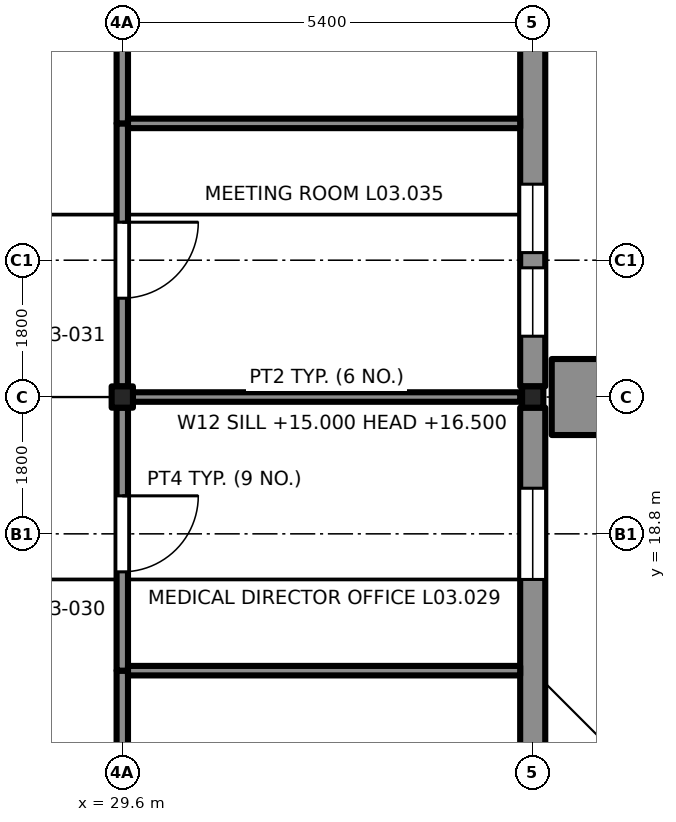
"""IFC4 building model, lengths in metres.
Left out: names, types, materials, properties, quantities, classifications, styles, units other than length and angle.
Written with IfcOpenShell. Run it as: python <this file> out.ifc"""

import sys

from ifc_helpers import new_model, si_unit, direction, frame, frame_2d, origin, origin_2d, place, context, subcontext, project, spatial, rectangle, extrude, element, fill, save


model = new_model("IFC4")
c1 = context("Model", 3, precision=1e-05, world=origin(), true_north=direction((0.0, 1.0)))
c2 = subcontext(c1, "Body", "Model", "MODEL_VIEW")
j1 = project(units=[si_unit("LENGTHUNIT", "METRE"), si_unit("PLANEANGLEUNIT", "RADIAN")], contexts=[c1])
p1 = place(None, origin())
s1 = spatial("IfcSite", under=j1, at=p1, CompositionType="ELEMENT")
p2 = place(p1, origin())
s2 = spatial("IfcBuilding", under=s1, at=p2, CompositionType="ELEMENT")
p3 = place(p2, frame((0.0, 0.0, 14.1)))
s3 = spatial("IfcBuildingStorey", under=s2, at=p3, CompositionType="ELEMENT", Elevation=14.1)
for number, where, z_axis, x_axis in (
    (1, (29.6, 20.6, 0.0), (0.0, 0.0, 1.0), (1.0, 0.0, 0.0)),
    (2, (35.0, 20.6, 0.0), (0.0, 0.0, 1.0), (1.0, 0.0, 0.0)),
):
    element("IfcColumn", number, at=place(p3, frame(where, z_axis=z_axis, x_axis=x_axis)), inside=s3, PredefinedType="COLUMN", context=c2, shape_type="SweptSolid", body=[
        extrude(rectangle(XDim=0.28, YDim=0.28, at=origin_2d()), origin(), (0.0, 0.0, 1.0), 3.9),
    ])
p4 = place(p3, frame((35.0, 20.46, 0.0), z_axis=(0.0, 0.0, 1.0), x_axis=(0.0, -1.0, 0.0)))
e3 = element("IfcWall", 3, at=p4, inside=s3, PredefinedType="SOLIDWALL", context=c2, shape_type="SweptSolid", body=[
    extrude(rectangle(XDim=6.92, YDim=0.33, at=frame_2d((3.46, 0.0))), origin(), (0.0, 0.0, 1.0), 3.2),
])
p5 = place(p4, frame((4.66, 0.0, 0.9)))
e4 = element("IfcOpeningElement", 4, at=p5, cuts=e3, PredefinedType="OPENING", context=c2, shape_type="SweptSolid", body=[
    extrude(rectangle(XDim=1.2, YDim=1.5, at=frame_2d((0.6, 0.75))), frame((0.0, 0.175, 0.0), z_axis=(0.0, -1.0, 0.0), x_axis=(1.0, 0.0, 0.0)), (0.0, 0.0, 1.0), 0.35),
])
p6 = place(p4, frame((1.06, 0.0, 0.9)))
e5 = element("IfcOpeningElement", 5, at=p6, cuts=e3, PredefinedType="OPENING", context=c2, shape_type="SweptSolid", body=[
    extrude(rectangle(XDim=1.2, YDim=1.5, at=frame_2d((0.6, 0.75))), frame((0.0, 0.175, 0.0), z_axis=(0.0, -1.0, 0.0), x_axis=(1.0, 0.0, 0.0)), (0.0, 0.0, 1.0), 0.35),
])
p7 = place(p3, frame((35.0, 27.66, 0.0), z_axis=(0.0, 0.0, 1.0), x_axis=(0.0, -1.0, 0.0)))
e6 = element("IfcWall", 6, at=p7, inside=s3, PredefinedType="SOLIDWALL", context=c2, shape_type="SweptSolid", body=[
    extrude(rectangle(XDim=6.92, YDim=0.33, at=frame_2d((3.46, 0.0))), origin(), (0.0, 0.0, 1.0), 3.2),
])
p8 = place(p7, frame((5.36, 0.0, 0.6)))
e7 = element("IfcOpeningElement", 7, at=p8, cuts=e6, PredefinedType="OPENING", context=c2, shape_type="SweptSolid", body=[
    extrude(rectangle(XDim=0.9, YDim=2.4, at=frame_2d((0.45, 1.2))), frame((0.0, 0.175, 0.0), z_axis=(0.0, -1.0, 0.0), x_axis=(1.0, 0.0, 0.0)), (0.0, 0.0, 1.0), 0.35),
])
p9 = place(p7, frame((4.26, 0.0, 0.6)))
e8 = element("IfcOpeningElement", 8, at=p9, cuts=e6, PredefinedType="OPENING", context=c2, shape_type="SweptSolid", body=[
    extrude(rectangle(XDim=0.9, YDim=2.4, at=frame_2d((0.45, 1.2))), frame((0.0, 0.175, 0.0), z_axis=(0.0, -1.0, 0.0), x_axis=(1.0, 0.0, 0.0)), (0.0, 0.0, 1.0), 0.35),
])
p10 = place(p7, frame((1.06, 0.0, 0.9)))
e9 = element("IfcOpeningElement", 9, at=p10, cuts=e6, PredefinedType="OPENING", context=c2, shape_type="SweptSolid", body=[
    extrude(rectangle(XDim=1.2, YDim=1.5, at=frame_2d((0.6, 0.75))), frame((0.0, 0.175, 0.0), z_axis=(0.0, -1.0, 0.0), x_axis=(1.0, 0.0, 0.0)), (0.0, 0.0, 1.0), 0.35),
])
p11 = place(p3, frame((35.625, 21.1, 0.0), z_axis=(0.0, 0.0, 1.0), x_axis=(0.0, -1.0, 0.0)))
e10 = element("IfcWall", 10, at=p11, inside=s3, PredefinedType="SOLIDWALL", context=c2, shape_type="SweptSolid", body=[
    extrude(rectangle(XDim=1.0, YDim=0.75, at=frame_2d((0.5, 0.0))), origin(), (0.0, 0.0, 1.0), 3.9),
])
p12 = place(p3, frame((35.0, 16.4, 3.2), z_axis=(0.0, 0.0, 1.0), x_axis=(0.0, -1.0, 0.0)))
e11 = element("IfcWall", 11, at=p12, inside=s3, PredefinedType="SOLIDWALL", context=c2, shape_type="SweptSolid", body=[
    extrude(rectangle(XDim=1.5, YDim=0.23, at=frame_2d((0.75, 0.0))), origin(), (0.0, 0.0, 1.0), 3.1),
])
p13 = place(p3, frame((35.0, 17.6, 3.2), z_axis=(0.0, 0.0, 1.0), x_axis=(0.0, -1.0, 0.0)))
e12 = element("IfcWall", 12, at=p13, inside=s3, PredefinedType="SOLIDWALL", context=c2, shape_type="SweptSolid", body=[
    extrude(rectangle(XDim=1.2, YDim=0.23, at=frame_2d((0.6, 0.0))), origin(), (0.0, 0.0, 1.0), 4.1),
])
p14 = place(p3, frame((35.0, 19.1, 3.2), z_axis=(0.0, 0.0, 1.0), x_axis=(0.0, -1.0, 0.0)))
e13 = element("IfcWall", 13, at=p14, inside=s3, PredefinedType="SOLIDWALL", context=c2, shape_type="SweptSolid", body=[
    extrude(rectangle(XDim=1.5, YDim=0.23, at=frame_2d((0.75, 0.0))), origin(), (0.0, 0.0, 1.0), 3.1),
])
p15 = place(p3, frame((35.0, 20.46, 3.2), z_axis=(0.0, 0.0, 1.0), x_axis=(0.0, -1.0, 0.0)))
e14 = element("IfcWall", 14, at=p15, inside=s3, PredefinedType="SOLIDWALL", context=c2, shape_type="SweptSolid", body=[
    extrude(rectangle(XDim=1.36, YDim=0.23, at=frame_2d((0.68, 0.0))), origin(), (0.0, 0.0, 1.0), 2.1),
])
p16 = place(p3, frame((35.0, 22.1, 3.2), z_axis=(0.0, 0.0, 1.0), x_axis=(0.0, -1.0, 0.0)))
e15 = element("IfcWall", 15, at=p16, inside=s3, PredefinedType="SOLIDWALL", context=c2, shape_type="SweptSolid", body=[
    extrude(rectangle(XDim=1.36, YDim=0.23, at=frame_2d((0.68, 0.0))), origin(), (0.0, 0.0, 1.0), 2.1),
])
p17 = place(p3, frame((35.0, 23.6, 3.2), z_axis=(0.0, 0.0, 1.0), x_axis=(0.0, -1.0, 0.0)))
e16 = element("IfcWall", 16, at=p17, inside=s3, PredefinedType="SOLIDWALL", context=c2, shape_type="SweptSolid", body=[
    extrude(rectangle(XDim=1.5, YDim=0.23, at=frame_2d((0.75, 0.0))), origin(), (0.0, 0.0, 1.0), 3.1),
])
p18 = place(p3, frame((35.0, 24.8, 3.2), z_axis=(0.0, 0.0, 1.0), x_axis=(0.0, -1.0, 0.0)))
e17 = element("IfcWall", 17, at=p18, inside=s3, PredefinedType="SOLIDWALL", context=c2, shape_type="SweptSolid", body=[
    extrude(rectangle(XDim=1.2, YDim=0.23, at=frame_2d((0.6, 0.0))), origin(), (0.0, 0.0, 1.0), 4.1),
])
p19 = place(p3, frame((35.0, 26.3, 3.2), z_axis=(0.0, 0.0, 1.0), x_axis=(0.0, -1.0, 0.0)))
e18 = element("IfcWall", 18, at=p19, inside=s3, PredefinedType="SOLIDWALL", context=c2, shape_type="SweptSolid", body=[
    extrude(rectangle(XDim=1.5, YDim=0.23, at=frame_2d((0.75, 0.0))), origin(), (0.0, 0.0, 1.0), 3.1),
])
p20 = place(p3, frame((29.6, 17.0, 0.0), z_axis=(0.0, 0.0, 1.0), x_axis=(0.0, -1.0, 0.0)))
e19 = element("IfcWall", 19, at=p20, inside=s3, PredefinedType="PARTITIONING", context=c2, shape_type="SweptSolid", body=[
    extrude(rectangle(XDim=3.46, YDim=0.15, at=frame_2d((1.73, 0.0))), origin(), (0.0, 0.0, 1.0), 5.233),
])
p21 = place(p20, frame((1.3, 0.0, 0.0)))
e20 = element("IfcOpeningElement", 20, at=p21, cuts=e19, PredefinedType="OPENING", context=c2, shape_type="SweptSolid", body=[
    extrude(rectangle(XDim=1.0, YDim=2.1, at=frame_2d((0.5, 1.05))), frame((0.0, 0.085, 0.0), z_axis=(0.0, -1.0, 0.0), x_axis=(1.0, 0.0, 0.0)), (0.0, 0.0, 1.0), 0.17),
])
p22 = place(p3, frame((29.6, 20.46, 0.0), z_axis=(0.0, 0.0, 1.0), x_axis=(0.0, -1.0, 0.0)))
e21 = element("IfcWall", 21, at=p22, inside=s3, PredefinedType="PARTITIONING", context=c2, shape_type="SweptSolid", body=[
    extrude(rectangle(XDim=3.46, YDim=0.15, at=frame_2d((1.73, 0.0))), origin(), (0.0, 0.0, 1.0), 5.233),
])
p23 = place(p22, frame((1.16, 0.0, 0.0)))
e22 = element("IfcOpeningElement", 22, at=p23, cuts=e21, PredefinedType="OPENING", context=c2, shape_type="SweptSolid", body=[
    extrude(rectangle(XDim=1.0, YDim=2.1, at=frame_2d((0.5, 1.05))), frame((0.0, 0.085, 0.0), z_axis=(0.0, -1.0, 0.0), x_axis=(1.0, 0.0, 0.0)), (0.0, 0.0, 1.0), 0.17),
])
p24 = place(p3, frame((34.835, 17.0, 0.0), z_axis=(0.0, 0.0, 1.0), x_axis=(-1.0, 0.0, 0.0)))
e23 = element("IfcWall", 23, at=p24, inside=s3, PredefinedType="PARTITIONING", context=c2, shape_type="SweptSolid", body=[
    extrude(rectangle(XDim=5.16, YDim=0.125, at=frame_2d((2.58, 0.0))), origin(), (0.0, 0.0, 1.0), 5.233),
])
p25 = place(p3, frame((29.6, 24.2, 0.0), z_axis=(0.0, 0.0, 1.0), x_axis=(0.0, -1.0, 0.0)))
e24 = element("IfcWall", 24, at=p25, inside=s3, PredefinedType="PARTITIONING", context=c2, shape_type="SweptSolid", body=[
    extrude(rectangle(XDim=3.46, YDim=0.15, at=frame_2d((1.73, 0.0))), origin(), (0.0, 0.0, 1.0), 5.233),
])
p26 = place(p25, frame((1.3, 0.0, 0.0)))
e25 = element("IfcOpeningElement", 25, at=p26, cuts=e24, PredefinedType="OPENING", context=c2, shape_type="SweptSolid", body=[
    extrude(rectangle(XDim=1.0, YDim=2.1, at=frame_2d((0.5, 1.05))), frame((0.0, 0.085, 0.0), z_axis=(0.0, -1.0, 0.0), x_axis=(1.0, 0.0, 0.0)), (0.0, 0.0, 1.0), 0.17),
])
p27 = place(p3, frame((34.835, 20.6, 0.0), z_axis=(0.0, 0.0, 1.0), x_axis=(-1.0, 0.0, 0.0)))
e26 = element("IfcWall", 26, at=p27, inside=s3, PredefinedType="PARTITIONING", context=c2, shape_type="SweptSolid", body=[
    extrude(rectangle(XDim=5.095, YDim=0.125, at=frame_2d((2.547, 0.0))), origin(), (0.0, 0.0, 1.0), 3.9),
])
p28 = place(p3, frame((29.6, 27.66, 0.0), z_axis=(0.0, 0.0, 1.0), x_axis=(0.0, -1.0, 0.0)))
e27 = element("IfcWall", 27, at=p28, inside=s3, PredefinedType="PARTITIONING", context=c2, shape_type="SweptSolid", body=[
    extrude(rectangle(XDim=3.46, YDim=0.15, at=frame_2d((1.73, 0.0))), origin(), (0.0, 0.0, 1.0), 5.233),
])
p29 = place(p28, frame((1.16, 0.0, 0.0)))
e28 = element("IfcOpeningElement", 28, at=p29, cuts=e27, PredefinedType="OPENING", context=c2, shape_type="SweptSolid", body=[
    extrude(rectangle(XDim=1.0, YDim=2.1, at=frame_2d((0.5, 1.05))), frame((0.0, 0.085, 0.0), z_axis=(0.0, -1.0, 0.0), x_axis=(1.0, 0.0, 0.0)), (0.0, 0.0, 1.0), 0.17),
])
p30 = place(p3, frame((34.835, 24.2, 0.0), z_axis=(0.0, 0.0, 1.0), x_axis=(-1.0, 0.0, 0.0)))
e29 = element("IfcWall", 29, at=p30, inside=s3, PredefinedType="PARTITIONING", context=c2, shape_type="SweptSolid", body=[
    extrude(rectangle(XDim=5.16, YDim=0.125, at=frame_2d((2.58, 0.0))), origin(), (0.0, 0.0, 1.0), 5.233),
])
p31 = place(p6, origin())
e30 = element("IfcWindow", 30, at=p31, inside=s3, PartitioningType="SINGLE_PANEL", PredefinedType="WINDOW", context=c2, shape_type="SweptSolid", body=[
    extrude(rectangle(XDim=1.2, YDim=1.5, at=frame_2d((0.6, 0.75))), frame((0.0, -0.03, 0.0), z_axis=(0.0, -1.0, 0.0), x_axis=(1.0, 0.0, 0.0)), (0.0, 0.0, 1.0), 0.06),
])
fill(e5, e30)
p32 = place(p8, origin())
e31 = element("IfcWindow", 31, at=p32, inside=s3, PartitioningType="SINGLE_PANEL", PredefinedType="WINDOW", context=c2, shape_type="SweptSolid", body=[
    extrude(rectangle(XDim=0.9, YDim=2.4, at=frame_2d((0.45, 1.2))), frame((0.0, -0.03, 0.0), z_axis=(0.0, -1.0, 0.0), x_axis=(1.0, 0.0, 0.0)), (0.0, 0.0, 1.0), 0.06),
])
fill(e7, e31)
p33 = place(p9, origin())
e32 = element("IfcWindow", 32, at=p33, inside=s3, PartitioningType="SINGLE_PANEL", PredefinedType="WINDOW", context=c2, shape_type="SweptSolid", body=[
    extrude(rectangle(XDim=0.9, YDim=2.4, at=frame_2d((0.45, 1.2))), frame((0.0, -0.03, 0.0), z_axis=(0.0, -1.0, 0.0), x_axis=(1.0, 0.0, 0.0)), (0.0, 0.0, 1.0), 0.06),
])
fill(e8, e32)
p34 = place(p23, origin())
e33 = element("IfcDoor", 33, at=p34, inside=s3, OperationType="SINGLE_SWING_LEFT", PredefinedType="DOOR", context=c2, shape_type="SweptSolid", body=[
    extrude(rectangle(XDim=1.0, YDim=2.1, at=frame_2d((0.5, 1.05))), frame((0.0, 0.025, 0.0), z_axis=(0.0, -1.0, 0.0), x_axis=(1.0, 0.0, 0.0)), (0.0, 0.0, 1.0), 0.05),
])
fill(e22, e33)
p35 = place(p26, origin())
e34 = element("IfcDoor", 34, at=p35, inside=s3, OperationType="SINGLE_SWING_RIGHT", PredefinedType="DOOR", context=c2, shape_type="SweptSolid", body=[
    extrude(rectangle(XDim=1.0, YDim=2.1, at=frame_2d((0.5, 1.05))), frame((0.0, 0.025, 0.0), z_axis=(0.0, -1.0, 0.0), x_axis=(1.0, 0.0, 0.0)), (0.0, 0.0, 1.0), 0.05),
])
fill(e25, e34)
save(model, sys.argv[1])
